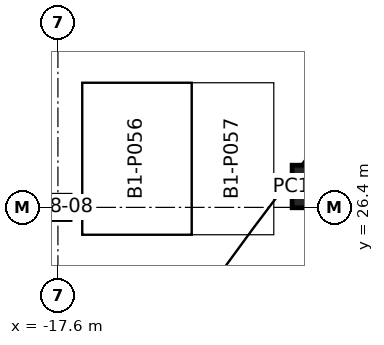
"""IFC4 building model, lengths in metres.
Left out: names, types, materials, properties, quantities, classifications, styles, units other than length and angle.
Written with IfcOpenShell. Run it as: python <this file> out.ifc"""

import sys

from ifc_helpers import new_model, si_unit, direction, frame, origin, origin_2d, place, context, subcontext, project, spatial, rectangle, extrude, element, save


model = new_model("IFC4")
c1 = context("Model", 3, precision=1e-05, world=origin(), true_north=direction((0.0, 1.0)))
c2 = subcontext(c1, "Body", "Model", "MODEL_VIEW")
j1 = project(units=[si_unit("LENGTHUNIT", "METRE"), si_unit("PLANEANGLEUNIT", "RADIAN")], contexts=[c1])
p1 = place(None, origin())
s1 = spatial("IfcSite", under=j1, at=p1, CompositionType="ELEMENT")
p2 = place(p1, origin())
s2 = spatial("IfcBuilding", under=s1, at=p2, CompositionType="ELEMENT")
p3 = place(p2, frame((0.0, 0.0, -4.5)))
s3 = spatial("IfcBuildingStorey", under=s2, at=p3, CompositionType="ELEMENT", Elevation=-4.5)
p4 = place(p3, frame((-9.197, 27.087, 0.0), z_axis=(0.0, 0.0, 1.0), x_axis=(0.609232107146, 0.792991954324, 0.0)))
e1 = element("IfcColumn", 1, at=p4, inside=s3, PredefinedType="COLUMN", context=c2, shape_type="SweptSolid", body=[
    extrude(rectangle(XDim=1.4, YDim=1.4, at=origin_2d()), origin(), (0.0, 0.0, 1.0), 4.5),
])
p5 = place(p3, frame((-17.6, 26.4, 0.0), z_axis=(0.0, 0.0, 1.0), x_axis=(1.0, 0.0, 0.0)))
e2 = element("IfcColumn", 2, at=p5, inside=s3, PredefinedType="COLUMN", context=c2, shape_type="SweptSolid", body=[
    extrude(rectangle(XDim=0.8, YDim=0.8, at=origin_2d()), origin(), (0.0, 0.0, 1.0), 4.15),
])
save(model, sys.argv[1])
